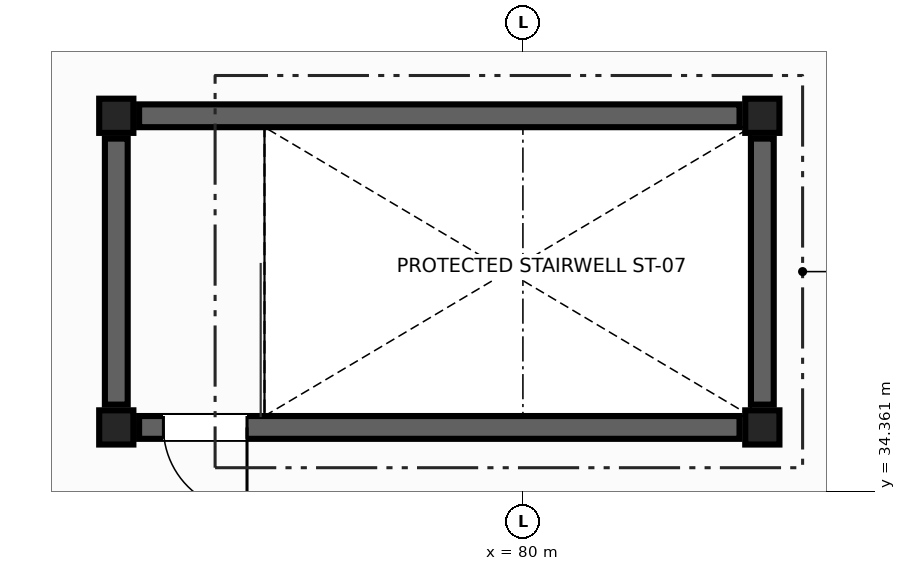
"""IFC4 building model, lengths in metres.
Left out: names, types, materials, properties, quantities, classifications, styles, units other than length and angle.
Written with IfcOpenShell. Run it as: python <this file> out.ifc"""

import sys

from ifc_helpers import new_model, si_unit, direction, frame, frame_2d, origin, origin_2d, place, context, subcontext, project, spatial, rectangle, extrude, element, fill, save


model = new_model("IFC4")
c1 = context("Model", 3, precision=1e-05, world=origin(), true_north=direction((0.0, 1.0)))
c2 = subcontext(c1, "Body", "Model", "MODEL_VIEW")
j1 = project(units=[si_unit("LENGTHUNIT", "METRE"), si_unit("PLANEANGLEUNIT", "RADIAN")], contexts=[c1])
p1 = place(None, origin())
s1 = spatial("IfcSite", under=j1, at=p1, CompositionType="ELEMENT")
p2 = place(p1, origin())
s2 = spatial("IfcBuilding", under=s1, at=p2, CompositionType="ELEMENT")
p3 = place(p2, frame((0.0, 0.0, 14.4)))
s3 = spatial("IfcBuildingStorey", under=s2, at=p3, CompositionType="ELEMENT", Elevation=14.4)
for number, where, z_axis, x_axis in (
    (1, (74.65, 35.2, 0.0), (0.0, 0.0, 1.0), (1.0, 0.0, 0.0)),
    (2, (83.15, 35.2, 0.0), (0.0, 0.0, 1.0), (1.0, 0.0, 0.0)),
    (3, (83.15, 39.3, 0.0), (0.0, 0.0, 1.0), (1.0, 0.0, 0.0)),
    (4, (74.65, 39.3, 0.0), (0.0, 0.0, 1.0), (1.0, 0.0, 0.0)),
):
    element("IfcColumn", number, at=place(p3, frame(where, z_axis=z_axis, x_axis=x_axis)), inside=s3, PredefinedType="COLUMN", context=c2, shape_type="SweptSolid", body=[
        extrude(rectangle(XDim=0.45, YDim=0.45, at=origin_2d()), origin(), (0.0, 0.0, 1.0), 4.28),
    ])
p4 = place(p3, frame((82.85, 35.2, 0.0), z_axis=(0.0, 0.0, 1.0), x_axis=(-1.0, 0.0, 0.0)))
e5 = element("IfcWall", 5, at=p4, inside=s3, PredefinedType="SHEAR", context=c2, shape_type="SweptSolid", body=[
    extrude(rectangle(XDim=7.9, YDim=0.3, at=frame_2d((3.95, 0.0))), origin(), (0.0, 0.0, 1.0), 4.28),
])
p5 = place(p4, frame((6.48, 0.0, 0.0)))
e6 = element("IfcOpeningElement", 6, at=p5, cuts=e5, PredefinedType="OPENING", context=c2, shape_type="SweptSolid", body=[
    extrude(rectangle(XDim=1.1, YDim=2.15, at=frame_2d((0.55, 1.075))), frame((0.0, 0.16, 0.0), z_axis=(0.0, -1.0, 0.0), x_axis=(1.0, 0.0, 0.0)), (0.0, 0.0, 1.0), 0.32),
])
p6 = place(p3, frame((74.65, 35.5, 0.0), z_axis=(0.0, 0.0, 1.0), x_axis=(0.0, 1.0, 0.0)))
e7 = element("IfcWall", 7, at=p6, inside=s3, PredefinedType="SHEAR", context=c2, shape_type="SweptSolid", body=[
    extrude(rectangle(XDim=3.5, YDim=0.3, at=frame_2d((1.75, 0.0))), origin(), (0.0, 0.0, 1.0), 4.28),
])
p7 = place(p3, frame((74.95, 39.3, 0.0), z_axis=(0.0, 0.0, 1.0), x_axis=(1.0, 0.0, 0.0)))
e8 = element("IfcWall", 8, at=p7, inside=s3, PredefinedType="SHEAR", context=c2, shape_type="SweptSolid", body=[
    extrude(rectangle(XDim=7.9, YDim=0.3, at=frame_2d((3.95, 0.0))), origin(), (0.0, 0.0, 1.0), 4.28),
])
p8 = place(p3, frame((83.15, 39.0, 0.0), z_axis=(0.0, 0.0, 1.0), x_axis=(0.0, -1.0, 0.0)))
e9 = element("IfcWall", 9, at=p8, inside=s3, PredefinedType="SHEAR", context=c2, shape_type="SweptSolid", body=[
    extrude(rectangle(XDim=3.5, YDim=0.3, at=frame_2d((1.75, 0.0))), origin(), (0.0, 0.0, 1.0), 4.28),
])
p9 = place(p5, origin())
e10 = element("IfcDoor", 10, at=p9, inside=s3, OperationType="SINGLE_SWING_LEFT", PredefinedType="DOOR", context=c2, shape_type="SweptSolid", body=[
    extrude(rectangle(XDim=1.1, YDim=2.15, at=frame_2d((0.55, 1.075))), frame((0.0, 0.025, 0.0), z_axis=(0.0, -1.0, 0.0), x_axis=(1.0, 0.0, 0.0)), (0.0, 0.0, 1.0), 0.05),
])
fill(e6, e10)
save(model, sys.argv[1])
